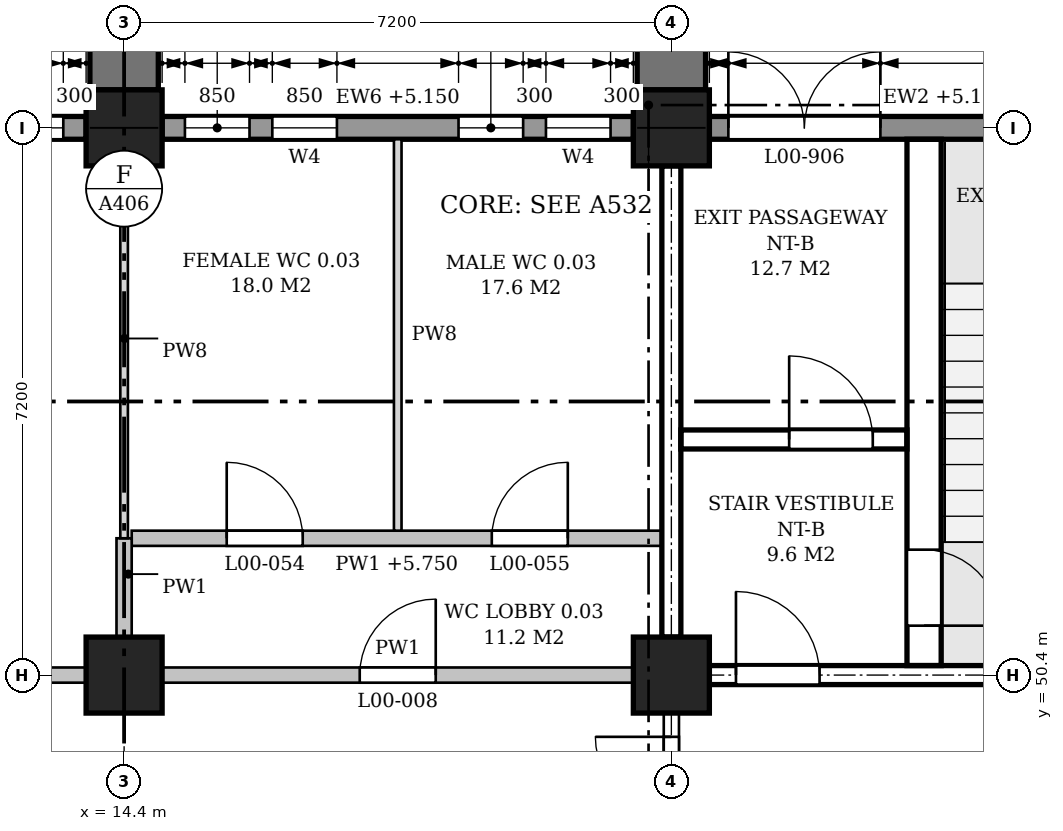
"""IFC4 building model, lengths in metres.
Left out: names, types, materials, properties, quantities, classifications, styles, units other than length and angle.
Written with IfcOpenShell. Run it as: python <this file> out.ifc"""

import sys

from ifc_helpers import new_model, si_unit, direction, frame, frame_2d, origin, origin_2d, place, context, subcontext, project, spatial, polyline, rectangle, outline, extrude, element, fill, save


model = new_model("IFC4")
c1 = context("Model", 3, precision=1e-05, world=origin(), true_north=direction((0.0, 1.0)))
c2 = subcontext(c1, "Body", "Model", "MODEL_VIEW")
j1 = project(units=[si_unit("LENGTHUNIT", "METRE"), si_unit("PLANEANGLEUNIT", "RADIAN")], contexts=[c1])
p1 = place(None, origin())
s1 = spatial("IfcSite", under=j1, at=p1, CompositionType="ELEMENT")
p2 = place(p1, origin())
s2 = spatial("IfcBuilding", under=s1, at=p2, CompositionType="ELEMENT")
p3 = place(p2, origin())
s3 = spatial("IfcBuildingStorey", under=s2, at=p3, CompositionType="ELEMENT", Elevation=0.0)
for number, where, z_axis, x_axis in (
    (1, (14.4, 50.4, 0.0), (0.0, 0.0, 1.0), (1.0, 0.0, 0.0)),
    (2, (14.4, 57.6, 0.0), (0.0, 0.0, 1.0), (1.0, 0.0, 0.0)),
    (3, (21.6, 50.4, 0.0), (0.0, 0.0, 1.0), (1.0, 0.0, 0.0)),
    (4, (21.6, 57.6, 0.0), (0.0, 0.0, 1.0), (1.0, 0.0, 0.0)),
):
    element("IfcColumn", number, at=place(p3, frame(where, z_axis=z_axis, x_axis=x_axis)), inside=s3, PredefinedType="COLUMN", context=c2, shape_type="SweptSolid", body=[
        extrude(rectangle(XDim=1.0, YDim=1.0, at=origin_2d()), origin(), (0.0, 0.0, 1.0), 6.0),
    ])
p4 = place(p3, frame((28.3, 57.6, 0.0), z_axis=(0.0, 0.0, 1.0), x_axis=(-1.0, 0.0, 0.0)))
e5 = element("IfcWall", 5, at=p4, inside=s3, PredefinedType="STANDARD", context=c2, shape_type="SweptSolid", body=[
    extrude(rectangle(XDim=6.2, YDim=0.3, at=frame_2d((3.1, 0.0))), origin(), (0.0, 0.0, 1.0), 5.15),
])
p5 = place(p4, frame((3.95, 0.0, 0.0)))
e6 = element("IfcOpeningElement", 6, at=p5, cuts=e5, PredefinedType="OPENING", context=c2, shape_type="SweptSolid", body=[
    extrude(rectangle(XDim=2.0, YDim=2.1, at=frame_2d((1.0, 1.05))), frame((0.0, 0.16, 0.0), z_axis=(0.0, -1.0, 0.0), x_axis=(1.0, 0.0, 0.0)), (0.0, 0.0, 1.0), 0.32),
])
p6 = place(p4, frame((0.85, 0.0, 0.9)))
e7 = element("IfcOpeningElement", 7, at=p6, cuts=e5, PredefinedType="OPENING", context=c2, shape_type="SweptSolid", body=[
    extrude(outline(polyline([(0.0, 0.0), (0.9, 0.0), (0.9, 3.55), (0.45, 4.0), (0.0, 3.55), (0.0, 0.0)])), frame((0.0, 0.16, 0.0), z_axis=(0.0, -1.0, 0.0), x_axis=(1.0, 0.0, 0.0)), (0.0, 0.0, 1.0), 0.32),
])
p7 = place(p3, frame((21.1, 57.6, 0.0), z_axis=(0.0, 0.0, 1.0), x_axis=(-1.0, 0.0, 0.0)))
e8 = element("IfcWall", 8, at=p7, inside=s3, PredefinedType="STANDARD", context=c2, shape_type="SweptSolid", body=[
    extrude(rectangle(XDim=6.2, YDim=0.3, at=frame_2d((3.1, 0.0))), origin(), (0.0, 0.0, 1.0), 5.15),
])
p8 = place(p7, frame((0.3, 0.0, 0.9)))
e9 = element("IfcOpeningElement", 9, at=p8, cuts=e8, PredefinedType="OPENING", context=c2, shape_type="SweptSolid", body=[
    extrude(outline(polyline([(0.0, 0.0), (0.85, 0.0), (0.85, 3.55), (0.425, 4.0), (0.0, 3.55), (0.0, 0.0)])), frame((0.0, 0.16, 0.0), z_axis=(0.0, -1.0, 0.0), x_axis=(1.0, 0.0, 0.0)), (0.0, 0.0, 1.0), 0.32),
])
p9 = place(p7, frame((1.45, 0.0, 0.9)))
e10 = element("IfcOpeningElement", 10, at=p9, cuts=e8, PredefinedType="OPENING", context=c2, shape_type="SweptSolid", body=[
    extrude(outline(polyline([(0.0, 0.0), (0.85, 0.0), (0.85, 3.55), (0.425, 4.0), (0.0, 3.55), (0.0, 0.0)])), frame((0.0, 0.16, 0.0), z_axis=(0.0, -1.0, 0.0), x_axis=(1.0, 0.0, 0.0)), (0.0, 0.0, 1.0), 0.32),
])
p10 = place(p7, frame((3.9, 0.0, 0.9)))
e11 = element("IfcOpeningElement", 11, at=p10, cuts=e8, PredefinedType="OPENING", context=c2, shape_type="SweptSolid", body=[
    extrude(outline(polyline([(0.0, 0.0), (0.85, 0.0), (0.85, 3.55), (0.425, 4.0), (0.0, 3.55), (0.0, 0.0)])), frame((0.0, 0.16, 0.0), z_axis=(0.0, -1.0, 0.0), x_axis=(1.0, 0.0, 0.0)), (0.0, 0.0, 1.0), 0.32),
])
p11 = place(p7, frame((5.05, 0.0, 0.9)))
e12 = element("IfcOpeningElement", 12, at=p11, cuts=e8, PredefinedType="OPENING", context=c2, shape_type="SweptSolid", body=[
    extrude(outline(polyline([(0.0, 0.0), (0.85, 0.0), (0.85, 3.55), (0.425, 4.0), (0.0, 3.55), (0.0, 0.0)])), frame((0.0, 0.16, 0.0), z_axis=(0.0, -1.0, 0.0), x_axis=(1.0, 0.0, 0.0)), (0.0, 0.0, 1.0), 0.32),
])
p12 = place(p3, frame((13.9, 57.6, 0.0), z_axis=(0.0, 0.0, 1.0), x_axis=(-1.0, 0.0, 0.0)))
e13 = element("IfcWall", 13, at=p12, inside=s3, PredefinedType="STANDARD", context=c2, shape_type="SweptSolid", body=[
    extrude(rectangle(XDim=6.2, YDim=0.3, at=frame_2d((3.1, 0.0))), origin(), (0.0, 0.0, 1.0), 5.15),
])
p13 = place(p12, frame((0.3, 0.0, 0.9)))
e14 = element("IfcOpeningElement", 14, at=p13, cuts=e13, PredefinedType="OPENING", context=c2, shape_type="SweptSolid", body=[
    extrude(outline(polyline([(0.0, 0.0), (0.85, 0.0), (0.85, 3.55), (0.425, 4.0), (0.0, 3.55), (0.0, 0.0)])), frame((0.0, 0.16, 0.0), z_axis=(0.0, -1.0, 0.0), x_axis=(1.0, 0.0, 0.0)), (0.0, 0.0, 1.0), 0.32),
])
p14 = place(p12, frame((1.45, 0.0, 0.9)))
e15 = element("IfcOpeningElement", 15, at=p14, cuts=e13, PredefinedType="OPENING", context=c2, shape_type="SweptSolid", body=[
    extrude(outline(polyline([(0.0, 0.0), (0.85, 0.0), (0.85, 3.55), (0.425, 4.0), (0.0, 3.55), (0.0, 0.0)])), frame((0.0, 0.16, 0.0), z_axis=(0.0, -1.0, 0.0), x_axis=(1.0, 0.0, 0.0)), (0.0, 0.0, 1.0), 0.32),
])
p15 = place(p12, frame((3.9, 0.0, 0.9)))
e16 = element("IfcOpeningElement", 16, at=p15, cuts=e13, PredefinedType="OPENING", context=c2, shape_type="SweptSolid", body=[
    extrude(outline(polyline([(0.0, 0.0), (0.85, 0.0), (0.85, 3.55), (0.425, 4.0), (0.0, 3.55), (0.0, 0.0)])), frame((0.0, 0.16, 0.0), z_axis=(0.0, -1.0, 0.0), x_axis=(1.0, 0.0, 0.0)), (0.0, 0.0, 1.0), 0.32),
])
p16 = place(p12, frame((5.05, 0.0, 0.9)))
e17 = element("IfcOpeningElement", 17, at=p16, cuts=e13, PredefinedType="OPENING", context=c2, shape_type="SweptSolid", body=[
    extrude(outline(polyline([(0.0, 0.0), (0.85, 0.0), (0.85, 3.55), (0.425, 4.0), (0.0, 3.55), (0.0, 0.0)])), frame((0.0, 0.16, 0.0), z_axis=(0.0, -1.0, 0.0), x_axis=(1.0, 0.0, 0.0)), (0.0, 0.0, 1.0), 0.32),
])
for number, where, z_axis, x_axis in (
    (18, (14.4, 58.1, 0.0), (0.0, 0.0, 1.0), (0.0, 1.0, 0.0)),
    (19, (21.6, 58.1, 0.0), (0.0, 0.0, 1.0), (0.0, 1.0, 0.0)),
):
    element("IfcWall", number, at=place(p3, frame(where, z_axis=z_axis, x_axis=x_axis)), inside=s3, PredefinedType="POLYGONAL", context=c2, shape_type="SweptSolid", body=[
        extrude(outline(polyline([(1.6, 0.0), (1.6, 20.9), (1.3, 21.35), (0.0, 21.35), (0.0, 0.0), (1.6, 0.0)])), frame((0.0, 0.45, 0.0), z_axis=(0.0, -1.0, 0.0), x_axis=(1.0, 0.0, 0.0)), (0.0, 0.0, 1.0), 0.9),
    ])
p17 = place(p3, frame((22.1, 50.4, 0.0), z_axis=(0.0, 0.0, 1.0), x_axis=(1.0, 0.0, 0.0)))
e20 = element("IfcWall", 20, at=p17, inside=s3, PredefinedType="SHEAR", context=c2, shape_type="SweptSolid", body=[
    extrude(rectangle(XDim=6.2, YDim=0.25, at=frame_2d((3.1, 0.0))), origin(), (0.0, 0.0, 1.0), 5.0),
])
p18 = place(p17, frame((0.35, 0.0, 0.0)))
e21 = element("IfcOpeningElement", 21, at=p18, cuts=e20, PredefinedType="OPENING", context=c2, shape_type="SweptSolid", body=[
    extrude(rectangle(XDim=1.1, YDim=2.1, at=frame_2d((0.55, 1.05))), frame((0.0, 0.135, 0.0), z_axis=(0.0, -1.0, 0.0), x_axis=(1.0, 0.0, 0.0)), (0.0, 0.0, 1.0), 0.27),
])
p19 = place(p3, frame((21.6, 50.9, 0.0), z_axis=(0.0, 0.0, 1.0), x_axis=(0.0, 1.0, 0.0)))
e22 = element("IfcWall", 22, at=p19, inside=s3, PredefinedType="SHEAR", context=c2, shape_type="SweptSolid", body=[
    extrude(rectangle(XDim=6.2, YDim=0.25, at=frame_2d((3.1, 0.0))), origin(), (0.0, 0.0, 1.0), 5.0),
])
p20 = place(p3, frame((24.925, 50.525, 0.0), z_axis=(0.0, 0.0, 1.0), x_axis=(0.0, 1.0, 0.0)))
e23 = element("IfcWall", 23, at=p20, inside=s3, PredefinedType="SHEAR", context=c2, shape_type="SweptSolid", body=[
    extrude(rectangle(XDim=6.925, YDim=0.45, at=frame_2d((3.462, 0.0))), origin(), (0.0, 0.0, 1.0), 5.75),
])
p21 = place(p20, frame((0.525, 0.0, 0.0)))
e24 = element("IfcOpeningElement", 24, at=p21, cuts=e23, PredefinedType="OPENING", context=c2, shape_type="SweptSolid", body=[
    extrude(rectangle(XDim=1.0, YDim=2.1, at=frame_2d((0.5, 1.05))), frame((0.0, 0.235, 0.0), z_axis=(0.0, -1.0, 0.0), x_axis=(1.0, 0.0, 0.0)), (0.0, 0.0, 1.0), 0.47),
])
p22 = place(p3, frame((21.725, 53.5, 0.0), z_axis=(0.0, 0.0, 1.0), x_axis=(1.0, 0.0, 0.0)))
e25 = element("IfcWall", 25, at=p22, inside=s3, PredefinedType="SHEAR", context=c2, shape_type="SweptSolid", body=[
    extrude(rectangle(XDim=2.975, YDim=0.25, at=frame_2d((1.487, 0.0))), origin(), (0.0, 0.0, 1.0), 5.75),
])
p23 = place(p22, frame((1.425, 0.0, 0.0)))
e26 = element("IfcOpeningElement", 26, at=p23, cuts=e25, PredefinedType="OPENING", context=c2, shape_type="SweptSolid", body=[
    extrude(rectangle(XDim=1.1, YDim=2.1, at=frame_2d((0.55, 1.05))), frame((0.0, 0.135, 0.0), z_axis=(0.0, -1.0, 0.0), x_axis=(1.0, 0.0, 0.0)), (0.0, 0.0, 1.0), 0.27),
])
p24 = place(p3, frame((7.7, 50.4, 0.0), z_axis=(0.0, 0.0, 1.0), x_axis=(1.0, 0.0, 0.0)))
e27 = element("IfcWall", 27, at=p24, inside=s3, PredefinedType="PARTITIONING", context=c2, shape_type="SweptSolid", body=[
    extrude(rectangle(XDim=6.2, YDim=0.2, at=frame_2d((3.1, 0.0))), origin(), (0.0, 0.0, 1.0), 5.0),
])
p25 = place(p24, frame((2.6, 0.0, 0.0)))
e28 = element("IfcOpeningElement", 28, at=p25, cuts=e27, PredefinedType="OPENING", context=c2, shape_type="SweptSolid", body=[
    extrude(rectangle(XDim=1.0, YDim=2.1, at=frame_2d((0.5, 1.05))), frame((0.0, 0.11, 0.0), z_axis=(0.0, -1.0, 0.0), x_axis=(1.0, 0.0, 0.0)), (0.0, 0.0, 1.0), 0.22),
])
p26 = place(p3, frame((14.9, 50.4, 0.0), z_axis=(0.0, 0.0, 1.0), x_axis=(1.0, 0.0, 0.0)))
e29 = element("IfcWall", 29, at=p26, inside=s3, PredefinedType="PARTITIONING", context=c2, shape_type="SweptSolid", body=[
    extrude(rectangle(XDim=6.2, YDim=0.2, at=frame_2d((3.1, 0.0))), origin(), (0.0, 0.0, 1.0), 5.0),
])
p27 = place(p26, frame((2.6, 0.0, 0.0)))
e30 = element("IfcOpeningElement", 30, at=p27, cuts=e29, PredefinedType="OPENING", context=c2, shape_type="SweptSolid", body=[
    extrude(rectangle(XDim=1.0, YDim=2.1, at=frame_2d((0.5, 1.05))), frame((0.0, 0.11, 0.0), z_axis=(0.0, -1.0, 0.0), x_axis=(1.0, 0.0, 0.0)), (0.0, 0.0, 1.0), 0.22),
])
p28 = place(p3, frame((14.5, 52.2, 0.0), z_axis=(0.0, 0.0, 1.0), x_axis=(1.0, 0.0, 0.0)))
e31 = element("IfcWall", 31, at=p28, inside=s3, PredefinedType="PARTITIONING", context=c2, shape_type="SweptSolid", body=[
    extrude(outline(polyline([(0.0, 0.0), (6.975, 0.0), (6.975, 5.0), (6.85, 5.0), (6.85, 5.75), (0.15, 5.75), (0.15, 5.0), (0.0, 5.0), (0.0, 0.0)])), frame((0.0, 0.1, 0.0), z_axis=(0.0, -1.0, 0.0), x_axis=(1.0, 0.0, 0.0)), (0.0, 0.0, 1.0), 0.2),
])
p29 = place(p28, frame((1.25, 0.0, 0.0)))
e32 = element("IfcOpeningElement", 32, at=p29, cuts=e31, PredefinedType="OPENING", context=c2, shape_type="SweptSolid", body=[
    extrude(rectangle(XDim=1.0, YDim=2.1, at=frame_2d((0.5, 1.05))), frame((0.0, 0.11, 0.0), z_axis=(0.0, -1.0, 0.0), x_axis=(1.0, 0.0, 0.0)), (0.0, 0.0, 1.0), 0.22),
])
p30 = place(p28, frame((4.738, 0.0, 0.0)))
e33 = element("IfcOpeningElement", 33, at=p30, cuts=e31, PredefinedType="OPENING", context=c2, shape_type="SweptSolid", body=[
    extrude(rectangle(XDim=1.0, YDim=2.1, at=frame_2d((0.5, 1.05))), frame((0.0, 0.11, 0.0), z_axis=(0.0, -1.0, 0.0), x_axis=(1.0, 0.0, 0.0)), (0.0, 0.0, 1.0), 0.22),
])
p31 = place(p3, frame((14.4, 50.9, 0.0), z_axis=(0.0, 0.0, 1.0), x_axis=(0.0, 1.0, 0.0)))
e34 = element("IfcWall", 34, at=p31, inside=s3, PredefinedType="PARTITIONING", context=c2, shape_type="SweptSolid", body=[
    extrude(rectangle(XDim=1.3, YDim=0.2, at=frame_2d((0.65, 0.0))), origin(), (0.0, 0.0, 1.0), 5.0),
])
p32 = place(p3, frame((14.4, 52.2, 0.0), z_axis=(0.0, 0.0, 1.0), x_axis=(0.0, 1.0, 0.0)))
e35 = element("IfcWall", 35, at=p32, inside=s3, PredefinedType="PARTITIONING", context=c2, shape_type="SweptSolid", body=[
    extrude(rectangle(XDim=4.9, YDim=0.1, at=frame_2d((2.45, 0.0))), origin(), (0.0, 0.0, 1.0), 5.0),
])
p33 = place(p3, frame((18.0, 52.3, 0.0), z_axis=(0.0, 0.0, 1.0), x_axis=(0.0, 1.0, 0.0)))
e36 = element("IfcWall", 36, at=p33, inside=s3, PredefinedType="PARTITIONING", context=c2, shape_type="SweptSolid", body=[
    extrude(rectangle(XDim=5.15, YDim=0.1, at=frame_2d((2.575, 0.0))), origin(), (0.0, 0.0, 1.0), 5.0),
])
p34 = place(p3, frame((21.6, 47.275, 0.0), z_axis=(0.0, 0.0, 1.0), x_axis=(0.0, 1.0, 0.0)))
e37 = element("IfcWall", 37, at=p34, inside=s3, PredefinedType="PARTITIONING", context=c2, shape_type="SweptSolid", body=[
    extrude(rectangle(XDim=2.625, YDim=0.2, at=frame_2d((1.312, 0.0))), origin(), (0.0, 0.0, 1.0), 5.0),
])
p35 = place(p34, frame((0.312, 0.0, 0.0)))
e38 = element("IfcOpeningElement", 38, at=p35, cuts=e37, PredefinedType="OPENING", context=c2, shape_type="SweptSolid", body=[
    extrude(rectangle(XDim=2.0, YDim=2.4, at=frame_2d((1.0, 1.2))), frame((0.0, 0.11, 0.0), z_axis=(0.0, -1.0, 0.0), x_axis=(1.0, 0.0, 0.0)), (0.0, 0.0, 1.0), 0.22),
])
p36 = place(p5, frame((2.0, 0.0, 0.0), z_axis=(0.0, 0.0, 1.0), x_axis=(-1.0, 0.0, 0.0)))
e39 = element("IfcDoor", 39, at=p36, inside=s3, OperationType="DOUBLE_DOOR_SINGLE_SWING", PredefinedType="DOOR", context=c2, shape_type="SweptSolid", body=[
    extrude(rectangle(XDim=2.0, YDim=2.1, at=frame_2d((1.0, 1.05))), frame((0.0, 0.025, 0.0), z_axis=(0.0, -1.0, 0.0), x_axis=(1.0, 0.0, 0.0)), (0.0, 0.0, 1.0), 0.05),
])
fill(e6, e39)
p37 = place(p8, origin())
e40 = element("IfcWindow", 40, at=p37, inside=s3, PartitioningType="SINGLE_PANEL", PredefinedType="WINDOW", context=c2, shape_type="SweptSolid", body=[
    extrude(outline(polyline([(0.0, 0.0), (0.85, 0.0), (0.85, 3.55), (0.425, 4.0), (0.0, 3.55), (0.0, 0.0)])), frame((0.0, 0.03, 0.0), z_axis=(0.0, -1.0, 0.0), x_axis=(1.0, 0.0, 0.0)), (0.0, 0.0, 1.0), 0.06),
])
fill(e9, e40)
p38 = place(p9, origin())
e41 = element("IfcWindow", 41, at=p38, inside=s3, PartitioningType="SINGLE_PANEL", PredefinedType="WINDOW", context=c2, shape_type="SweptSolid", body=[
    extrude(outline(polyline([(0.0, 0.0), (0.85, 0.0), (0.85, 3.55), (0.425, 4.0), (0.0, 3.55), (0.0, 0.0)])), frame((0.0, 0.03, 0.0), z_axis=(0.0, -1.0, 0.0), x_axis=(1.0, 0.0, 0.0)), (0.0, 0.0, 1.0), 0.06),
])
fill(e10, e41)
p39 = place(p10, origin())
e42 = element("IfcWindow", 42, at=p39, inside=s3, PartitioningType="SINGLE_PANEL", PredefinedType="WINDOW", context=c2, shape_type="SweptSolid", body=[
    extrude(outline(polyline([(0.0, 0.0), (0.85, 0.0), (0.85, 3.55), (0.425, 4.0), (0.0, 3.55), (0.0, 0.0)])), frame((0.0, 0.03, 0.0), z_axis=(0.0, -1.0, 0.0), x_axis=(1.0, 0.0, 0.0)), (0.0, 0.0, 1.0), 0.06),
])
fill(e11, e42)
p40 = place(p11, origin())
e43 = element("IfcWindow", 43, at=p40, inside=s3, PartitioningType="SINGLE_PANEL", PredefinedType="WINDOW", context=c2, shape_type="SweptSolid", body=[
    extrude(outline(polyline([(0.0, 0.0), (0.85, 0.0), (0.85, 3.55), (0.425, 4.0), (0.0, 3.55), (0.0, 0.0)])), frame((0.0, 0.03, 0.0), z_axis=(0.0, -1.0, 0.0), x_axis=(1.0, 0.0, 0.0)), (0.0, 0.0, 1.0), 0.06),
])
fill(e12, e43)
p41 = place(p13, origin())
e44 = element("IfcWindow", 44, at=p41, inside=s3, PartitioningType="SINGLE_PANEL", PredefinedType="WINDOW", context=c2, shape_type="SweptSolid", body=[
    extrude(outline(polyline([(0.0, 0.0), (0.85, 0.0), (0.85, 3.55), (0.425, 4.0), (0.0, 3.55), (0.0, 0.0)])), frame((0.0, 0.03, 0.0), z_axis=(0.0, -1.0, 0.0), x_axis=(1.0, 0.0, 0.0)), (0.0, 0.0, 1.0), 0.06),
])
fill(e14, e44)
p42 = place(p21, frame((1.0, 0.0, 0.0), z_axis=(0.0, 0.0, 1.0), x_axis=(-1.0, 0.0, 0.0)))
e45 = element("IfcDoor", 45, at=p42, inside=s3, OperationType="SINGLE_SWING_RIGHT", PredefinedType="DOOR", context=c2, shape_type="SweptSolid", body=[
    extrude(rectangle(XDim=1.0, YDim=2.1, at=frame_2d((0.5, 1.05))), frame((0.0, 0.025, 0.0), z_axis=(0.0, -1.0, 0.0), x_axis=(1.0, 0.0, 0.0)), (0.0, 0.0, 1.0), 0.05),
])
fill(e24, e45)
p43 = place(p18, origin())
e46 = element("IfcDoor", 46, at=p43, inside=s3, OperationType="SINGLE_SWING_LEFT", PredefinedType="DOOR", context=c2, shape_type="SweptSolid", body=[
    extrude(rectangle(XDim=1.1, YDim=2.1, at=frame_2d((0.55, 1.05))), frame((0.0, 0.025, 0.0), z_axis=(0.0, -1.0, 0.0), x_axis=(1.0, 0.0, 0.0)), (0.0, 0.0, 1.0), 0.05),
])
fill(e21, e46)
p44 = place(p23, origin())
e47 = element("IfcDoor", 47, at=p44, inside=s3, OperationType="SINGLE_SWING_LEFT", PredefinedType="DOOR", context=c2, shape_type="SweptSolid", body=[
    extrude(rectangle(XDim=1.1, YDim=2.1, at=frame_2d((0.55, 1.05))), frame((0.0, 0.025, 0.0), z_axis=(0.0, -1.0, 0.0), x_axis=(1.0, 0.0, 0.0)), (0.0, 0.0, 1.0), 0.05),
])
fill(e26, e47)
p45 = place(p35, origin())
e48 = element("IfcDoor", 48, at=p45, inside=s3, OperationType="DOUBLE_DOOR_SINGLE_SWING", PredefinedType="DOOR", context=c2, shape_type="SweptSolid", body=[
    extrude(rectangle(XDim=2.0, YDim=2.4, at=frame_2d((1.0, 1.2))), frame((0.0, 0.025, 0.0), z_axis=(0.0, -1.0, 0.0), x_axis=(1.0, 0.0, 0.0)), (0.0, 0.0, 1.0), 0.05),
])
fill(e38, e48)
p46 = place(p27, origin())
e49 = element("IfcDoor", 49, at=p46, inside=s3, OperationType="SINGLE_SWING_RIGHT", PredefinedType="DOOR", context=c2, shape_type="SweptSolid", body=[
    extrude(rectangle(XDim=1.0, YDim=2.1, at=frame_2d((0.5, 1.05))), frame((0.0, 0.025, 0.0), z_axis=(0.0, -1.0, 0.0), x_axis=(1.0, 0.0, 0.0)), (0.0, 0.0, 1.0), 0.05),
])
fill(e30, e49)
p47 = place(p29, origin())
e50 = element("IfcDoor", 50, at=p47, inside=s3, OperationType="SINGLE_SWING_LEFT", PredefinedType="DOOR", context=c2, shape_type="SweptSolid", body=[
    extrude(rectangle(XDim=1.0, YDim=2.1, at=frame_2d((0.5, 1.05))), frame((0.0, 0.025, 0.0), z_axis=(0.0, -1.0, 0.0), x_axis=(1.0, 0.0, 0.0)), (0.0, 0.0, 1.0), 0.05),
])
fill(e32, e50)
p48 = place(p30, origin())
e51 = element("IfcDoor", 51, at=p48, inside=s3, OperationType="SINGLE_SWING_RIGHT", PredefinedType="DOOR", context=c2, shape_type="SweptSolid", body=[
    extrude(rectangle(XDim=1.0, YDim=2.1, at=frame_2d((0.5, 1.05))), frame((0.0, 0.025, 0.0), z_axis=(0.0, -1.0, 0.0), x_axis=(1.0, 0.0, 0.0)), (0.0, 0.0, 1.0), 0.05),
])
fill(e33, e51)
save(model, sys.argv[1])
